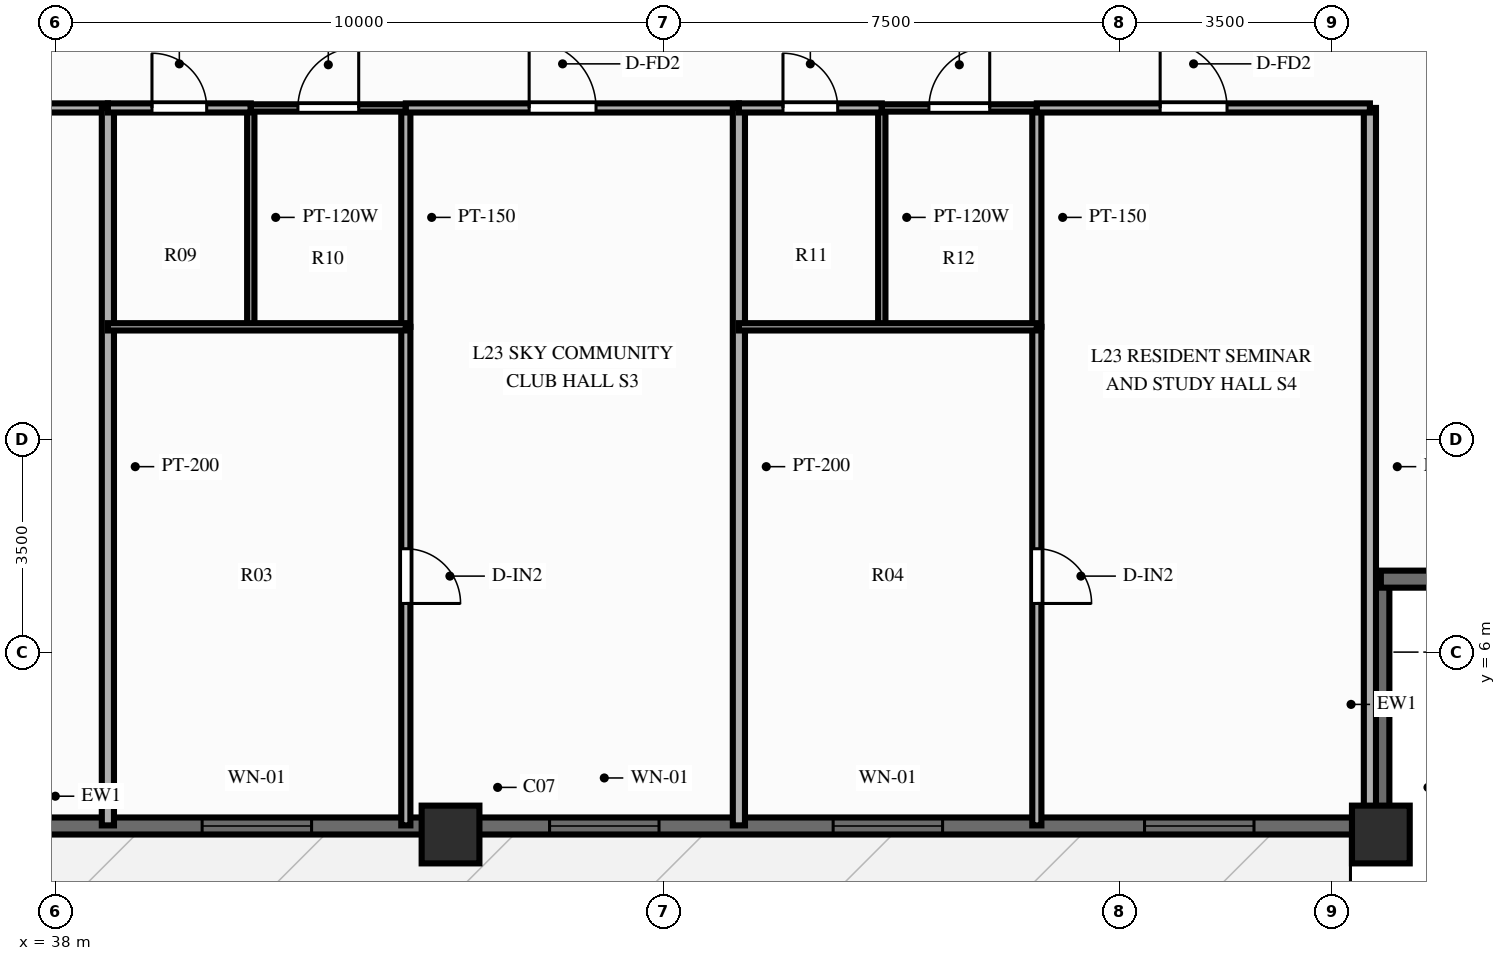
"""IFC4 building model, lengths in metres.
Left out: names, types, materials, properties, quantities, classifications, styles, units other than length and angle.
Written with IfcOpenShell. Run it as: python <this file> out.ifc"""

import sys

from ifc_helpers import new_model, si_unit, direction, frame, frame_2d, origin, origin_2d, place, context, subcontext, project, spatial, rectangle, extrude, source, transform, mapped, element, fill, save


model = new_model("IFC4")
c1 = context("Model", 3, precision=1e-05, world=origin(), true_north=direction((0.0, 1.0)))
c2 = subcontext(c1, "Body", "Model", "MODEL_VIEW")
j1 = project(units=[si_unit("LENGTHUNIT", "METRE"), si_unit("PLANEANGLEUNIT", "RADIAN")], contexts=[c1])
p1 = place(None, origin())
s1 = spatial("IfcSite", under=j1, at=p1, CompositionType="ELEMENT")
p2 = place(p1, origin())
s2 = spatial("IfcBuilding", under=s1, at=p2, CompositionType="ELEMENT")
p3 = place(p2, frame((0.0, 0.0, 74.35)))
s3 = spatial("IfcBuildingStorey", under=s2, at=p3, CompositionType="ELEMENT", Elevation=74.35)
m1 = source(origin(), c2, "Body", "SweptSolid", [
    extrude(rectangle(XDim=0.95, YDim=0.95, at=origin_2d()), origin(), (0.0, 0.0, 1.0), 3.5),
])
for number, where, z_axis, x_axis in (
    (1, (44.5, 3.0, 0.0), (0.0, 0.0, 1.0), (1.0, 0.0, 0.0)),
    (2, (59.8, 3.0, 0.0), (0.0, 0.0, 1.0), (1.0, 0.0, 0.0)),
):
    element("IfcColumn", number, at=place(p3, frame(where, z_axis=z_axis, x_axis=x_axis)), inside=s3, PredefinedType="COLUMN", context=c2, shape_type="MappedRepresentation", body=[
        mapped(m1, transform((0.0, 0.0, 0.0), scale=1.0)),
    ])
p4 = place(p3, frame((16.2, 3.14, 0.0), z_axis=(0.0, 0.0, 1.0), x_axis=(1.0, 0.0, 0.0)))
e3 = element("IfcWall", 3, at=p4, inside=s3, PredefinedType="SOLIDWALL", context=c2, shape_type="SweptSolid", body=[
    extrude(rectangle(XDim=43.6, YDim=0.28, at=frame_2d((21.8, 0.0))), origin(), (0.0, 0.0, 1.0), 2.78),
])
p5 = place(p4, frame((1.798, 0.0, 0.85)))
e4 = element("IfcOpeningElement", 4, at=p5, cuts=e3, PredefinedType="OPENING", context=c2, shape_type="SweptSolid", body=[
    extrude(rectangle(XDim=1.8, YDim=1.65, at=frame_2d((0.9, 0.825))), frame((0.0, 0.152, 0.0), z_axis=(0.0, -1.0, 0.0), x_axis=(1.0, 0.0, 0.0)), (0.0, 0.0, 1.0), 0.304),
])
p6 = place(p4, frame((7.351, 0.0, 0.85)))
e5 = element("IfcOpeningElement", 5, at=p6, cuts=e3, PredefinedType="OPENING", context=c2, shape_type="SweptSolid", body=[
    extrude(rectangle(XDim=1.8, YDim=1.65, at=frame_2d((0.9, 0.825))), frame((0.0, 0.152, 0.0), z_axis=(0.0, -1.0, 0.0), x_axis=(1.0, 0.0, 0.0)), (0.0, 0.0, 1.0), 0.304),
])
p7 = place(p4, frame((12.304, 0.0, 0.85)))
e6 = element("IfcOpeningElement", 6, at=p7, cuts=e3, PredefinedType="OPENING", context=c2, shape_type="SweptSolid", body=[
    extrude(rectangle(XDim=1.8, YDim=1.65, at=frame_2d((0.9, 0.825))), frame((0.0, 0.152, 0.0), z_axis=(0.0, -1.0, 0.0), x_axis=(1.0, 0.0, 0.0)), (0.0, 0.0, 1.0), 0.304),
])
p8 = place(p4, frame((20.044, 0.0, 0.0), z_axis=(0.0, 0.0, 1.0), x_axis=(-1.0, 0.0, 0.0)))
e7 = element("IfcOpeningElement", 7, at=p8, cuts=e3, PredefinedType="OPENING", context=c2, shape_type="SweptSolid", body=[
    extrude(rectangle(XDim=1.1, YDim=2.15, at=frame_2d((0.55, 1.075))), frame((0.0, 0.152, 0.0), z_axis=(0.0, -1.0, 0.0), x_axis=(1.0, 0.0, 0.0)), (0.0, 0.0, 1.0), 0.304),
])
p9 = place(p4, frame((24.215, 0.0, 0.85)))
e8 = element("IfcOpeningElement", 8, at=p9, cuts=e3, PredefinedType="OPENING", context=c2, shape_type="SweptSolid", body=[
    extrude(rectangle(XDim=1.8, YDim=1.65, at=frame_2d((0.9, 0.825))), frame((0.0, 0.152, 0.0), z_axis=(0.0, -1.0, 0.0), x_axis=(1.0, 0.0, 0.0)), (0.0, 0.0, 1.0), 0.304),
])
p10 = place(p4, frame((29.929, 0.0, 0.85)))
e9 = element("IfcOpeningElement", 9, at=p10, cuts=e3, PredefinedType="OPENING", context=c2, shape_type="SweptSolid", body=[
    extrude(rectangle(XDim=1.8, YDim=1.65, at=frame_2d((0.9, 0.825))), frame((0.0, 0.152, 0.0), z_axis=(0.0, -1.0, 0.0), x_axis=(1.0, 0.0, 0.0)), (0.0, 0.0, 1.0), 0.304),
])
p11 = place(p4, frame((34.592, 0.0, 0.85)))
e10 = element("IfcOpeningElement", 10, at=p11, cuts=e3, PredefinedType="OPENING", context=c2, shape_type="SweptSolid", body=[
    extrude(rectangle(XDim=1.8, YDim=1.65, at=frame_2d((0.9, 0.825))), frame((0.0, 0.152, 0.0), z_axis=(0.0, -1.0, 0.0), x_axis=(1.0, 0.0, 0.0)), (0.0, 0.0, 1.0), 0.304),
])
p12 = place(p4, frame((39.714, 0.0, 0.85)))
e11 = element("IfcOpeningElement", 11, at=p12, cuts=e3, PredefinedType="OPENING", context=c2, shape_type="SweptSolid", body=[
    extrude(rectangle(XDim=1.8, YDim=1.65, at=frame_2d((0.9, 0.825))), frame((0.0, 0.152, 0.0), z_axis=(0.0, -1.0, 0.0), x_axis=(1.0, 0.0, 0.0)), (0.0, 0.0, 1.0), 0.304),
])
for number, where, z_axis, x_axis in (
    (12, (59.8, 3.08, 0.0), (0.0, 0.0, 1.0), (0.0, 1.0, 0.0)),
    (13, (59.8, 7.2, 0.0), (0.0, 0.0, 1.0), (1.0, 0.0, 0.0)),
):
    element("IfcWall", number, at=place(p3, frame(where, z_axis=z_axis, x_axis=x_axis)), inside=s3, PredefinedType="SOLIDWALL", context=c2, shape_type="SweptSolid", body=[
        extrude(rectangle(XDim=4.12, YDim=0.28, at=frame_2d((2.06, 0.0))), origin(), (0.0, 0.0, 1.0), 2.78),
    ])
p13 = place(p3, frame((59.62, 14.95, 0.0), z_axis=(0.0, 0.0, 1.0), x_axis=(0.0, -1.0, 0.0)))
e14 = element("IfcWall", 14, at=p13, inside=s3, PredefinedType="PARTITIONING", context=c2, shape_type="SweptSolid", body=[
    extrude(rectangle(XDim=11.8, YDim=0.2, at=frame_2d((5.9, 0.0))), origin(), (0.0, 0.0, 1.0), 3.29),
])
p14 = place(p3, frame((32.522, 14.95, 0.0), z_axis=(0.0, 0.0, 1.0), x_axis=(1.0, 0.0, 0.0)))
e15 = element("IfcWall", 15, at=p14, inside=s3, PredefinedType="PARTITIONING", context=c2, shape_type="SweptSolid", body=[
    extrude(rectangle(XDim=6.342, YDim=0.15, at=frame_2d((3.171, 0.0))), origin(), (0.0, 0.0, 1.0), 3.29),
])
p15 = place(p14, frame((2.424, 0.0, 0.0)))
e16 = element("IfcOpeningElement", 16, at=p15, cuts=e15, PredefinedType="OPENING", context=c2, shape_type="SweptSolid", body=[
    extrude(rectangle(XDim=1.1, YDim=2.15, at=frame_2d((0.55, 1.075))), frame((0.0, 0.087, 0.0), z_axis=(0.0, -1.0, 0.0), x_axis=(1.0, 0.0, 0.0)), (0.0, 0.0, 1.0), 0.174),
])
p16 = place(p3, frame((38.865, 14.95, 0.0), z_axis=(0.0, 0.0, 1.0), x_axis=(0.0, -1.0, 0.0)))
e17 = element("IfcWall", 17, at=p16, inside=s3, PredefinedType="PARTITIONING", context=c2, shape_type="SweptSolid", body=[
    extrude(rectangle(XDim=11.8, YDim=0.2, at=frame_2d((5.9, 0.0))), origin(), (0.0, 0.0, 1.0), 3.29),
])
p17 = place(p3, frame((41.215, 14.95, 0.0), z_axis=(0.0, 0.0, 1.0), x_axis=(0.0, -1.0, 0.0)))
e18 = element("IfcWall", 18, at=p17, inside=s3, PredefinedType="PARTITIONING", context=c2, shape_type="SweptSolid", body=[
    extrude(rectangle(XDim=3.6, YDim=0.12, at=frame_2d((1.8, 0.0))), origin(), (0.0, 0.0, 1.0), 3.29),
])
p18 = place(p3, frame((43.765, 14.95, 0.0), z_axis=(0.0, 0.0, 1.0), x_axis=(0.0, -1.0, 0.0)))
e19 = element("IfcWall", 19, at=p18, inside=s3, PredefinedType="PARTITIONING", context=c2, shape_type="SweptSolid", body=[
    extrude(rectangle(XDim=3.6, YDim=0.15, at=frame_2d((1.8, 0.0))), origin(), (0.0, 0.0, 1.0), 3.29),
])
p19 = place(p3, frame((43.765, 11.35, 0.0), z_axis=(0.0, 0.0, 1.0), x_axis=(0.0, -1.0, 0.0)))
e20 = element("IfcWall", 20, at=p19, inside=s3, PredefinedType="PARTITIONING", context=c2, shape_type="SweptSolid", body=[
    extrude(rectangle(XDim=8.2, YDim=0.15, at=frame_2d((4.1, 0.0))), origin(), (0.0, 0.0, 1.0), 3.29),
])
p20 = place(p19, frame((3.65, 0.0, 0.0)))
e21 = element("IfcOpeningElement", 21, at=p20, cuts=e20, PredefinedType="OPENING", context=c2, shape_type="SweptSolid", body=[
    extrude(rectangle(XDim=0.9, YDim=2.1, at=frame_2d((0.45, 1.05))), frame((0.0, 0.087, 0.0), z_axis=(0.0, -1.0, 0.0), x_axis=(1.0, 0.0, 0.0)), (0.0, 0.0, 1.0), 0.174),
])
p21 = place(p3, frame((38.865, 11.35, 0.0), z_axis=(0.0, 0.0, 1.0), x_axis=(1.0, 0.0, 0.0)))
e22 = element("IfcWall", 22, at=p21, inside=s3, PredefinedType="PARTITIONING", context=c2, shape_type="SweptSolid", body=[
    extrude(rectangle(XDim=4.9, YDim=0.12, at=frame_2d((2.45, 0.0))), origin(), (0.0, 0.0, 1.0), 3.29),
])
p22 = place(p3, frame((38.865, 14.95, 0.0), z_axis=(0.0, 0.0, 1.0), x_axis=(1.0, 0.0, 0.0)))
e23 = element("IfcWall", 23, at=p22, inside=s3, PredefinedType="PARTITIONING", context=c2, shape_type="SweptSolid", body=[
    extrude(rectangle(XDim=2.35, YDim=0.15, at=frame_2d((1.175, 0.0))), origin(), (0.0, 0.0, 1.0), 3.29),
])
p23 = place(p22, frame((0.725, 0.0, 0.0)))
e24 = element("IfcOpeningElement", 24, at=p23, cuts=e23, PredefinedType="OPENING", context=c2, shape_type="SweptSolid", body=[
    extrude(rectangle(XDim=0.9, YDim=2.1, at=frame_2d((0.45, 1.05))), frame((0.0, 0.087, 0.0), z_axis=(0.0, -1.0, 0.0), x_axis=(1.0, 0.0, 0.0)), (0.0, 0.0, 1.0), 0.174),
])
p24 = place(p3, frame((41.215, 14.95, 0.0), z_axis=(0.0, 0.0, 1.0), x_axis=(1.0, 0.0, 0.0)))
e25 = element("IfcWall", 25, at=p24, inside=s3, PredefinedType="PARTITIONING", context=c2, shape_type="SweptSolid", body=[
    extrude(rectangle(XDim=2.55, YDim=0.12, at=frame_2d((1.275, 0.0))), origin(), (0.0, 0.0, 1.0), 3.29),
])
p25 = place(p24, frame((0.775, 0.0, 0.0)))
e26 = element("IfcOpeningElement", 26, at=p25, cuts=e25, PredefinedType="OPENING", context=c2, shape_type="SweptSolid", body=[
    extrude(rectangle(XDim=1.0, YDim=2.1, at=frame_2d((0.5, 1.05))), frame((0.0, 0.072, 0.0), z_axis=(0.0, -1.0, 0.0), x_axis=(1.0, 0.0, 0.0)), (0.0, 0.0, 1.0), 0.144),
])
p26 = place(p3, frame((43.765, 14.95, 0.0), z_axis=(0.0, 0.0, 1.0), x_axis=(1.0, 0.0, 0.0)))
e27 = element("IfcWall", 27, at=p26, inside=s3, PredefinedType="PARTITIONING", context=c2, shape_type="SweptSolid", body=[
    extrude(rectangle(XDim=5.478, YDim=0.15, at=frame_2d((2.739, 0.0))), origin(), (0.0, 0.0, 1.0), 3.29),
])
p27 = place(p26, frame((2.028, 0.0, 0.0)))
e28 = element("IfcOpeningElement", 28, at=p27, cuts=e27, PredefinedType="OPENING", context=c2, shape_type="SweptSolid", body=[
    extrude(rectangle(XDim=1.1, YDim=2.15, at=frame_2d((0.55, 1.075))), frame((0.0, 0.087, 0.0), z_axis=(0.0, -1.0, 0.0), x_axis=(1.0, 0.0, 0.0)), (0.0, 0.0, 1.0), 0.174),
])
p28 = place(p3, frame((49.242, 14.95, 0.0), z_axis=(0.0, 0.0, 1.0), x_axis=(0.0, -1.0, 0.0)))
e29 = element("IfcWall", 29, at=p28, inside=s3, PredefinedType="PARTITIONING", context=c2, shape_type="SweptSolid", body=[
    extrude(rectangle(XDim=11.8, YDim=0.2, at=frame_2d((5.9, 0.0))), origin(), (0.0, 0.0, 1.0), 3.29),
])
p29 = place(p3, frame((51.592, 14.95, 0.0), z_axis=(0.0, 0.0, 1.0), x_axis=(0.0, -1.0, 0.0)))
e30 = element("IfcWall", 30, at=p29, inside=s3, PredefinedType="PARTITIONING", context=c2, shape_type="SweptSolid", body=[
    extrude(rectangle(XDim=3.6, YDim=0.12, at=frame_2d((1.8, 0.0))), origin(), (0.0, 0.0, 1.0), 3.29),
])
p30 = place(p3, frame((54.142, 14.95, 0.0), z_axis=(0.0, 0.0, 1.0), x_axis=(0.0, -1.0, 0.0)))
e31 = element("IfcWall", 31, at=p30, inside=s3, PredefinedType="PARTITIONING", context=c2, shape_type="SweptSolid", body=[
    extrude(rectangle(XDim=3.6, YDim=0.15, at=frame_2d((1.8, 0.0))), origin(), (0.0, 0.0, 1.0), 3.29),
])
p31 = place(p3, frame((54.142, 11.35, 0.0), z_axis=(0.0, 0.0, 1.0), x_axis=(0.0, -1.0, 0.0)))
e32 = element("IfcWall", 32, at=p31, inside=s3, PredefinedType="PARTITIONING", context=c2, shape_type="SweptSolid", body=[
    extrude(rectangle(XDim=8.2, YDim=0.15, at=frame_2d((4.1, 0.0))), origin(), (0.0, 0.0, 1.0), 3.29),
])
p32 = place(p31, frame((3.65, 0.0, 0.0)))
e33 = element("IfcOpeningElement", 33, at=p32, cuts=e32, PredefinedType="OPENING", context=c2, shape_type="SweptSolid", body=[
    extrude(rectangle(XDim=0.9, YDim=2.1, at=frame_2d((0.45, 1.05))), frame((0.0, 0.087, 0.0), z_axis=(0.0, -1.0, 0.0), x_axis=(1.0, 0.0, 0.0)), (0.0, 0.0, 1.0), 0.174),
])
p33 = place(p3, frame((49.242, 11.35, 0.0), z_axis=(0.0, 0.0, 1.0), x_axis=(1.0, 0.0, 0.0)))
e34 = element("IfcWall", 34, at=p33, inside=s3, PredefinedType="PARTITIONING", context=c2, shape_type="SweptSolid", body=[
    extrude(rectangle(XDim=4.9, YDim=0.12, at=frame_2d((2.45, 0.0))), origin(), (0.0, 0.0, 1.0), 3.29),
])
p34 = place(p3, frame((49.242, 14.95, 0.0), z_axis=(0.0, 0.0, 1.0), x_axis=(1.0, 0.0, 0.0)))
e35 = element("IfcWall", 35, at=p34, inside=s3, PredefinedType="PARTITIONING", context=c2, shape_type="SweptSolid", body=[
    extrude(rectangle(XDim=2.35, YDim=0.15, at=frame_2d((1.175, 0.0))), origin(), (0.0, 0.0, 1.0), 3.29),
])
p35 = place(p34, frame((0.725, 0.0, 0.0)))
e36 = element("IfcOpeningElement", 36, at=p35, cuts=e35, PredefinedType="OPENING", context=c2, shape_type="SweptSolid", body=[
    extrude(rectangle(XDim=0.9, YDim=2.1, at=frame_2d((0.45, 1.05))), frame((0.0, 0.087, 0.0), z_axis=(0.0, -1.0, 0.0), x_axis=(1.0, 0.0, 0.0)), (0.0, 0.0, 1.0), 0.174),
])
p36 = place(p3, frame((51.592, 14.95, 0.0), z_axis=(0.0, 0.0, 1.0), x_axis=(1.0, 0.0, 0.0)))
e37 = element("IfcWall", 37, at=p36, inside=s3, PredefinedType="PARTITIONING", context=c2, shape_type="SweptSolid", body=[
    extrude(rectangle(XDim=2.55, YDim=0.12, at=frame_2d((1.275, 0.0))), origin(), (0.0, 0.0, 1.0), 3.29),
])
p37 = place(p36, frame((0.775, 0.0, 0.0)))
e38 = element("IfcOpeningElement", 38, at=p37, cuts=e37, PredefinedType="OPENING", context=c2, shape_type="SweptSolid", body=[
    extrude(rectangle(XDim=1.0, YDim=2.1, at=frame_2d((0.5, 1.05))), frame((0.0, 0.072, 0.0), z_axis=(0.0, -1.0, 0.0), x_axis=(1.0, 0.0, 0.0)), (0.0, 0.0, 1.0), 0.144),
])
p38 = place(p3, frame((54.142, 14.95, 0.0), z_axis=(0.0, 0.0, 1.0), x_axis=(1.0, 0.0, 0.0)))
e39 = element("IfcWall", 39, at=p38, inside=s3, PredefinedType="PARTITIONING", context=c2, shape_type="SweptSolid", body=[
    extrude(rectangle(XDim=5.478, YDim=0.15, at=frame_2d((2.739, 0.0))), origin(), (0.0, 0.0, 1.0), 3.29),
])
p39 = place(p38, frame((2.028, 0.0, 0.0)))
e40 = element("IfcOpeningElement", 40, at=p39, cuts=e39, PredefinedType="OPENING", context=c2, shape_type="SweptSolid", body=[
    extrude(rectangle(XDim=1.1, YDim=2.15, at=frame_2d((0.55, 1.075))), frame((0.0, 0.087, 0.0), z_axis=(0.0, -1.0, 0.0), x_axis=(1.0, 0.0, 0.0)), (0.0, 0.0, 1.0), 0.174),
])
m2 = source(origin(), c2, "Body", "SweptSolid", [
    extrude(rectangle(XDim=1.8, YDim=1.65, at=frame_2d((0.9, 0.825))), frame((0.0, 0.03, 0.0), z_axis=(0.0, -1.0, 0.0), x_axis=(1.0, 0.0, 0.0)), (0.0, 0.0, 1.0), 0.06),
])
p40 = place(p9, origin())
e41 = element("IfcWindow", 41, at=p40, inside=s3, PartitioningType="SINGLE_PANEL", PredefinedType="WINDOW", context=c2, shape_type="MappedRepresentation", body=[
    mapped(m2, transform((0.0, 0.0, 0.0), scale=1.0)),
])
fill(e8, e41)
p41 = place(p10, origin())
e42 = element("IfcWindow", 42, at=p41, inside=s3, PartitioningType="SINGLE_PANEL", PredefinedType="WINDOW", context=c2, shape_type="MappedRepresentation", body=[
    mapped(m2, transform((0.0, 0.0, 0.0), scale=1.0)),
])
fill(e9, e42)
p42 = place(p11, origin())
e43 = element("IfcWindow", 43, at=p42, inside=s3, PartitioningType="SINGLE_PANEL", PredefinedType="WINDOW", context=c2, shape_type="MappedRepresentation", body=[
    mapped(m2, transform((0.0, 0.0, 0.0), scale=1.0)),
])
fill(e10, e43)
p43 = place(p12, origin())
e44 = element("IfcWindow", 44, at=p43, inside=s3, PartitioningType="SINGLE_PANEL", PredefinedType="WINDOW", context=c2, shape_type="MappedRepresentation", body=[
    mapped(m2, transform((0.0, 0.0, 0.0), scale=1.0)),
])
fill(e11, e44)
m3 = source(origin(), c2, "Body", "SweptSolid", [
    extrude(rectangle(XDim=0.9, YDim=2.1, at=frame_2d((0.45, 1.05))), frame((0.0, 0.025, 0.0), z_axis=(0.0, -1.0, 0.0), x_axis=(1.0, 0.0, 0.0)), (0.0, 0.0, 1.0), 0.05),
])
p44 = place(p20, origin())
e45 = element("IfcDoor", 45, at=p44, inside=s3, OperationType="SINGLE_SWING_RIGHT", PredefinedType="DOOR", context=c2, shape_type="MappedRepresentation", body=[
    mapped(m3, transform((0.0, 0.0, 0.0), scale=1.0)),
])
fill(e21, e45)
p45 = place(p23, origin())
e46 = element("IfcDoor", 46, at=p45, inside=s3, OperationType="SINGLE_SWING_LEFT", PredefinedType="DOOR", context=c2, shape_type="MappedRepresentation", body=[
    mapped(m3, transform((0.0, 0.0, 0.0), scale=1.0)),
])
fill(e24, e46)
m4 = source(origin(), c2, "Body", "SweptSolid", [
    extrude(rectangle(XDim=1.0, YDim=2.1, at=frame_2d((0.5, 1.05))), frame((0.0, 0.025, 0.0), z_axis=(0.0, -1.0, 0.0), x_axis=(1.0, 0.0, 0.0)), (0.0, 0.0, 1.0), 0.05),
])
p46 = place(p25, origin())
e47 = element("IfcDoor", 47, at=p46, inside=s3, OperationType="SINGLE_SWING_RIGHT", PredefinedType="DOOR", context=c2, shape_type="MappedRepresentation", body=[
    mapped(m4, transform((0.0, 0.0, 0.0), scale=1.0)),
])
fill(e26, e47)
m5 = source(origin(), c2, "Body", "SweptSolid", [
    extrude(rectangle(XDim=1.1, YDim=2.15, at=frame_2d((0.55, 1.075))), frame((0.0, 0.025, 0.0), z_axis=(0.0, -1.0, 0.0), x_axis=(1.0, 0.0, 0.0)), (0.0, 0.0, 1.0), 0.05),
])
p47 = place(p27, origin())
e48 = element("IfcDoor", 48, at=p47, inside=s3, OperationType="SINGLE_SWING_LEFT", PredefinedType="DOOR", context=c2, shape_type="MappedRepresentation", body=[
    mapped(m5, transform((0.0, 0.0, 0.0), scale=1.0)),
])
fill(e28, e48)
p48 = place(p32, origin())
e49 = element("IfcDoor", 49, at=p48, inside=s3, OperationType="SINGLE_SWING_RIGHT", PredefinedType="DOOR", context=c2, shape_type="MappedRepresentation", body=[
    mapped(m3, transform((0.0, 0.0, 0.0), scale=1.0)),
])
fill(e33, e49)
p49 = place(p35, origin())
e50 = element("IfcDoor", 50, at=p49, inside=s3, OperationType="SINGLE_SWING_LEFT", PredefinedType="DOOR", context=c2, shape_type="MappedRepresentation", body=[
    mapped(m3, transform((0.0, 0.0, 0.0), scale=1.0)),
])
fill(e36, e50)
p50 = place(p37, origin())
e51 = element("IfcDoor", 51, at=p50, inside=s3, OperationType="SINGLE_SWING_RIGHT", PredefinedType="DOOR", context=c2, shape_type="MappedRepresentation", body=[
    mapped(m4, transform((0.0, 0.0, 0.0), scale=1.0)),
])
fill(e38, e51)
p51 = place(p39, origin())
e52 = element("IfcDoor", 52, at=p51, inside=s3, OperationType="SINGLE_SWING_LEFT", PredefinedType="DOOR", context=c2, shape_type="MappedRepresentation", body=[
    mapped(m5, transform((0.0, 0.0, 0.0), scale=1.0)),
])
fill(e40, e52)
save(model, sys.argv[1])
